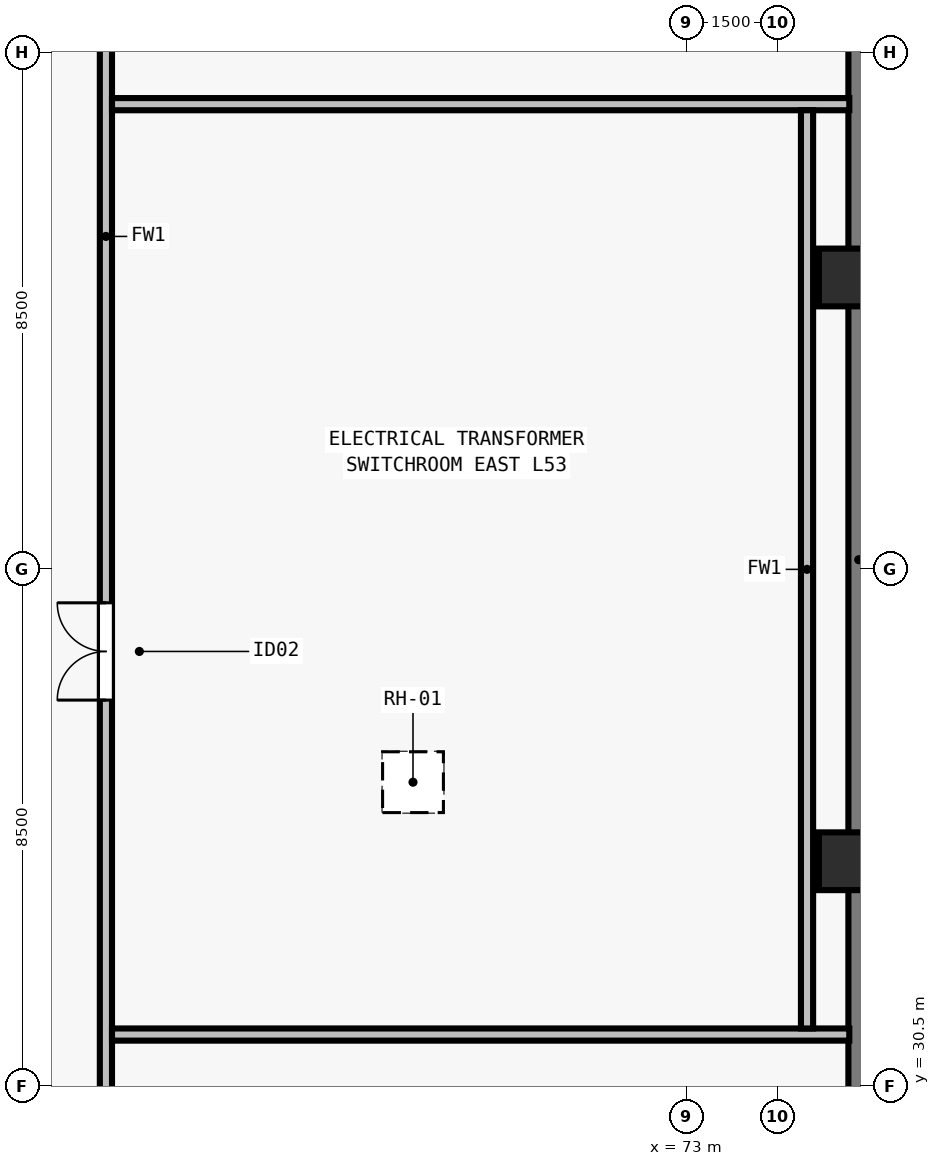
"""IFC4 building model, lengths in metres.
Left out: names, types, materials, properties, quantities, classifications, styles, units other than length and angle.
Written with IfcOpenShell. Run it as: python <this file> out.ifc"""

import sys

from ifc_helpers import new_model, si_unit, direction, frame, frame_2d, origin, origin_2d, place, context, subcontext, project, spatial, rectangle, extrude, element, fill, save


model = new_model("IFC4")
c1 = context("Model", 3, precision=1e-05, world=origin(), true_north=direction((0.0, 1.0)))
c2 = subcontext(c1, "Body", "Model", "MODEL_VIEW")
j1 = project(units=[si_unit("LENGTHUNIT", "METRE"), si_unit("PLANEANGLEUNIT", "RADIAN")], contexts=[c1])
p1 = place(None, origin())
s1 = spatial("IfcSite", under=j1, at=p1, CompositionType="ELEMENT")
p2 = place(p1, origin())
s2 = spatial("IfcBuilding", under=s1, at=p2, CompositionType="ELEMENT")
p3 = place(p2, frame((0.0, 0.0, 193.5)))
s3 = spatial("IfcBuildingStorey", under=s2, at=p3, CompositionType="ELEMENT", Elevation=193.5)
for number, where, z_axis, x_axis in (
    (1, (75.65, 34.2, 0.0), (0.0, 0.0, 1.0), (0.0, 1.0, 0.0)),
    (2, (75.65, 43.8, 0.0), (0.0, 0.0, 1.0), (0.0, 1.0, 0.0)),
):
    element("IfcColumn", number, at=place(p3, frame(where, z_axis=z_axis, x_axis=x_axis)), inside=s3, PredefinedType="COLUMN", context=c2, shape_type="SweptSolid", body=[
        extrude(rectangle(XDim=0.95, YDim=0.95, at=origin_2d()), origin(), (0.0, 0.0, 1.0), 4.5),
    ])
p4 = place(p3, frame((75.83, 59.0, 0.0), z_axis=(0.0, 0.0, 1.0), x_axis=(0.0, -1.0, 0.0)))
e3 = element("IfcWall", 3, at=p4, inside=s3, PredefinedType="SOLIDWALL", context=c2, shape_type="SweptSolid", body=[
    extrude(rectangle(XDim=39.682, YDim=0.34, at=frame_2d((19.841, 0.0))), origin(), (0.0, 0.0, 1.0), 4.29),
])
p5 = place(p3, frame((63.45, 27.65, 0.0), z_axis=(0.0, 0.0, 1.0), x_axis=(0.0, 1.0, 0.0)))
e4 = element("IfcWall", 4, at=p5, inside=s3, PredefinedType="SOLIDWALL", context=c2, shape_type="SweptSolid", body=[
    extrude(rectangle(XDim=22.7, YDim=0.2, at=frame_2d((11.35, 0.0))), origin(), (0.0, 0.0, 1.0), 4.29),
])
p6 = place(p5, frame((9.2, 0.0, 0.0)))
e5 = element("IfcOpeningElement", 5, at=p6, cuts=e4, PredefinedType="OPENING", context=c2, shape_type="SweptSolid", body=[
    extrude(rectangle(XDim=1.6, YDim=2.2, at=frame_2d((0.8, 1.1))), frame((0.0, 0.11, 0.0), z_axis=(0.0, -1.0, 0.0), x_axis=(1.0, 0.0, 0.0)), (0.0, 0.0, 1.0), 0.22),
])
for number, where, z_axis, x_axis in (
    (6, (63.55, 31.35, 0.0), (0.0, 0.0, 1.0), (1.0, 0.0, 0.0)),
    (7, (63.55, 46.65, 0.0), (0.0, 0.0, 1.0), (1.0, 0.0, 0.0)),
):
    element("IfcWall", number, at=place(p3, frame(where, z_axis=z_axis, x_axis=x_axis)), inside=s3, PredefinedType="SOLIDWALL", context=c2, shape_type="SweptSolid", body=[
        extrude(rectangle(XDim=12.125, YDim=0.2, at=frame_2d((6.062, 0.0))), origin(), (0.0, 0.0, 1.0), 2.465),
    ])
p7 = place(p3, frame((74.98, 31.45, 0.0), z_axis=(0.0, 0.0, 1.0), x_axis=(0.0, 1.0, 0.0)))
e8 = element("IfcWall", 8, at=p7, inside=s3, PredefinedType="SOLIDWALL", context=c2, shape_type="SweptSolid", body=[
    extrude(rectangle(XDim=15.1, YDim=0.2, at=frame_2d((7.55, 0.0))), origin(), (0.0, 0.0, 1.0), 4.29),
])
p8 = place(p3, frame((0.0, 0.0, -0.26)))
p9 = place(p8, frame((68.5, 35.5, 0.0)))
p10 = place(p9, frame((0.0, 0.0, 0.21)))
e9 = element("IfcDoor", 9, at=p10, inside=s3, OperationType="SINGLE_SWING_LEFT", PredefinedType="TRAPDOOR", context=c2, shape_type="SweptSolid", body=[
    extrude(rectangle(XDim=1.0, YDim=1.0, at=origin_2d()), origin(), (0.0, 0.0, 1.0), 0.05),
])
p11 = place(p6, origin())
e10 = element("IfcDoor", 10, at=p11, inside=s3, OperationType="DOUBLE_DOOR_SINGLE_SWING", PredefinedType="DOOR", context=c2, shape_type="SweptSolid", body=[
    extrude(rectangle(XDim=1.6, YDim=2.2, at=frame_2d((0.8, 1.1))), frame((0.0, 0.025, 0.0), z_axis=(0.0, -1.0, 0.0), x_axis=(1.0, 0.0, 0.0)), (0.0, 0.0, 1.0), 0.05),
])
fill(e5, e10)
save(model, sys.argv[1])
